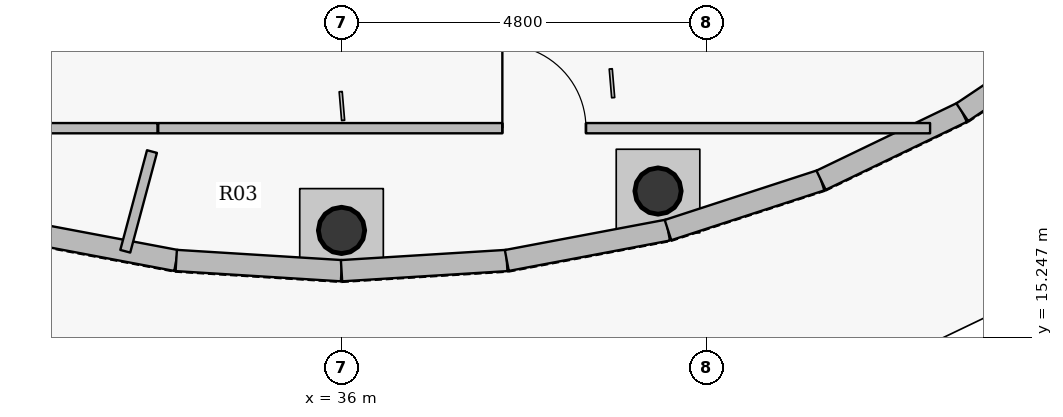
"""IFC4 building model, lengths in metres.
Left out: names, types, materials, properties, quantities, classifications, styles, units other than length and angle.
Written with IfcOpenShell. Run it as: python <this file> out.ifc"""

import sys

from ifc_helpers import new_model, si_unit, direction, frame, frame_2d, origin, origin_2d, place, context, subcontext, project, spatial, rectangle, hollow_circle, extrude, source, transform, mapped, element, fill, save


model = new_model("IFC4")
c1 = context("Model", 3, precision=1e-05, world=origin(), true_north=direction((0.0, 1.0)))
c2 = subcontext(c1, "Body", "Model", "MODEL_VIEW")
j1 = project(units=[si_unit("LENGTHUNIT", "METRE"), si_unit("PLANEANGLEUNIT", "RADIAN")], contexts=[c1])
p1 = place(None, origin())
s1 = spatial("IfcSite", under=j1, at=p1, CompositionType="ELEMENT")
p2 = place(p1, origin())
s2 = spatial("IfcBuilding", under=s1, at=p2, CompositionType="ELEMENT")
p3 = place(p2, frame((0.0, 0.0, 368.4)))
s3 = spatial("IfcBuildingStorey", under=s2, at=p3, CompositionType="ELEMENT", Elevation=368.4)
for number, where, z_axis, x_axis in (
    (1, (36.0, 16.655, -0.3), (0.0, 0.0, 1.0), (1.0, 0.0, 0.0)),
    (2, (40.164, 17.173, -0.3), (0.0, 0.0, 1.0), (1.0, 0.0, 0.0)),
):
    element("IfcColumn", number, at=place(p3, frame(where, z_axis=z_axis, x_axis=x_axis)), inside=s3, PredefinedType="COLUMN", context=c2, shape_type="SweptSolid", body=[
        extrude(hollow_circle(Radius=0.305, WallThickness=0.025, at=origin_2d()), origin(), (0.0, 0.0, 1.0), 4.8),
    ])
p4 = place(p3, frame((33.825, 16.26, 0.0), z_axis=(0.0, 0.0, 1.0), x_axis=(-0.982683423472, 0.18529244246, 0.0)))
e3 = element("IfcWall", 3, at=p4, inside=s3, PredefinedType="SOLIDWALL", context=c2, shape_type="SweptSolid", body=[
    extrude(rectangle(XDim=2.158, YDim=0.28, at=frame_2d((1.079, 0.0))), origin(), (0.0, 0.0, 1.0), 4.5),
])
for number, where, z_axis, x_axis in (
    (4, (36.0, 16.125, 0.0), (0.0, 0.0, 1.0), (-0.998, 0.062, 0.0)),
    (5, (38.175, 16.26, 0.0), (0.0, 0.0, 1.0), (-0.998, -0.062, 0.0)),
):
    element("IfcWall", number, at=place(p3, frame(where, z_axis=z_axis, x_axis=x_axis)), inside=s3, PredefinedType="SOLIDWALL", context=c2, shape_type="SweptSolid", body=[
        extrude(rectangle(XDim=2.179, YDim=0.28, at=frame_2d((1.089, 0.0))), origin(), (0.0, 0.0, 1.0), 4.5),
    ])
p5 = place(p3, frame((40.295, 16.659, 0.0), z_axis=(0.0, 0.0, 1.0), x_axis=(-0.982683423472, -0.18529244246, 0.0)))
e6 = element("IfcWall", 6, at=p5, inside=s3, PredefinedType="SOLIDWALL", context=c2, shape_type="SweptSolid", body=[
    extrude(rectangle(XDim=2.158, YDim=0.28, at=frame_2d((1.079, 0.0))), origin(), (0.0, 0.0, 1.0), 4.5),
])
p6 = place(p3, frame((42.309, 17.315, 0.0), z_axis=(0.0, 0.0, 1.0), x_axis=(-0.950895892553, -0.309510906959, 0.0)))
e7 = element("IfcWall", 7, at=p6, inside=s3, PredefinedType="SOLIDWALL", context=c2, shape_type="SweptSolid", body=[
    extrude(rectangle(XDim=2.118, YDim=0.28, at=frame_2d((1.059, 0.0))), origin(), (0.0, 0.0, 1.0), 4.5),
])
p7 = place(p3, frame((44.167, 18.209, 0.0), z_axis=(0.0, 0.0, 1.0), x_axis=(-0.900982812949, -0.433854780739, 0.0)))
e8 = element("IfcWall", 8, at=p7, inside=s3, PredefinedType="SOLIDWALL", context=c2, shape_type="SweptSolid", body=[
    extrude(rectangle(XDim=2.062, YDim=0.28, at=frame_2d((1.031, 0.0))), origin(), (0.0, 0.0, 1.0), 4.5),
])
p8 = place(p3, frame((45.822, 19.32, 0.0), z_axis=(0.0, 0.0, 1.0), x_axis=(-0.830407326996, -0.557156774411, 0.0)))
e9 = element("IfcWall", 9, at=p8, inside=s3, PredefinedType="SOLIDWALL", context=c2, shape_type="SweptSolid", body=[
    extrude(rectangle(XDim=1.993, YDim=0.28, at=frame_2d((0.997, 0.0))), origin(), (0.0, 0.0, 1.0), 4.5),
])
p9 = place(p3, frame((33.588, 18.0, 0.0), z_axis=(0.0, 0.0, 1.0), x_axis=(1.0, 0.0, 0.0)))
e10 = element("IfcWall", 10, at=p9, inside=s3, PredefinedType="PARTITIONING", context=c2, shape_type="SweptSolid", body=[
    extrude(rectangle(XDim=10.155, YDim=0.135, at=frame_2d((5.078, 0.0))), origin(), (0.0, 0.0, 1.0), 3.985),
])
p10 = place(p9, frame((4.528, 0.0, 0.0)))
e11 = element("IfcOpeningElement", 11, at=p10, cuts=e10, PredefinedType="OPENING", context=c2, shape_type="SweptSolid", body=[
    extrude(rectangle(XDim=1.1, YDim=2.15, at=origin_2d()), frame((0.55, 0.078, 1.075), z_axis=(0.0, -1.0, 0.0), x_axis=(1.0, 0.0, 0.0)), (0.0, 0.0, 1.0), 0.155),
])
p11 = place(p3, frame((33.578, 18.0, 0.0), z_axis=(0.0, 0.0, 1.0), x_axis=(-1.0, 0.0, 0.0)))
e12 = element("IfcWall", 12, at=p11, inside=s3, PredefinedType="PARTITIONING", context=c2, shape_type="SweptSolid", body=[
    extrude(rectangle(XDim=3.869, YDim=0.135, at=frame_2d((1.935, 0.0))), origin(), (0.0, 0.0, 1.0), 3.985),
])
p12 = place(p3, frame((33.155, 16.381, 0.0), z_axis=(0.0, 0.0, 1.0), x_axis=(0.258915829907, 0.965899887682, 0.0)))
e13 = element("IfcWall", 13, at=p12, inside=s3, PredefinedType="PARTITIONING", context=c2, shape_type="SweptSolid", body=[
    extrude(rectangle(XDim=1.358, YDim=0.135, at=frame_2d((0.679, 0.0))), origin(), (0.0, 0.0, 1.0), 3.985),
])
m1 = source(origin(), c2, "Body", "SweptSolid", [
    extrude(rectangle(XDim=1.1, YDim=2.15, at=origin_2d()), frame((0.55, 0.025, 1.075), z_axis=(0.0, -1.0, 0.0), x_axis=(1.0, 0.0, 0.0)), (0.0, 0.0, 1.0), 0.05),
])
p13 = place(p10, origin())
e14 = element("IfcDoor", 14, at=p13, inside=s3, OperationType="SINGLE_SWING_LEFT", PredefinedType="DOOR", context=c2, shape_type="MappedRepresentation", body=[
    mapped(m1, transform((0.0, 0.0, 0.0), x_axis=(1.0, 0.0, 0.0), y_axis=(0.0, 1.0, 0.0), z_axis=(0.0, 0.0, 1.0), scale=1.0)),
])
fill(e11, e14)
save(model, sys.argv[1])
